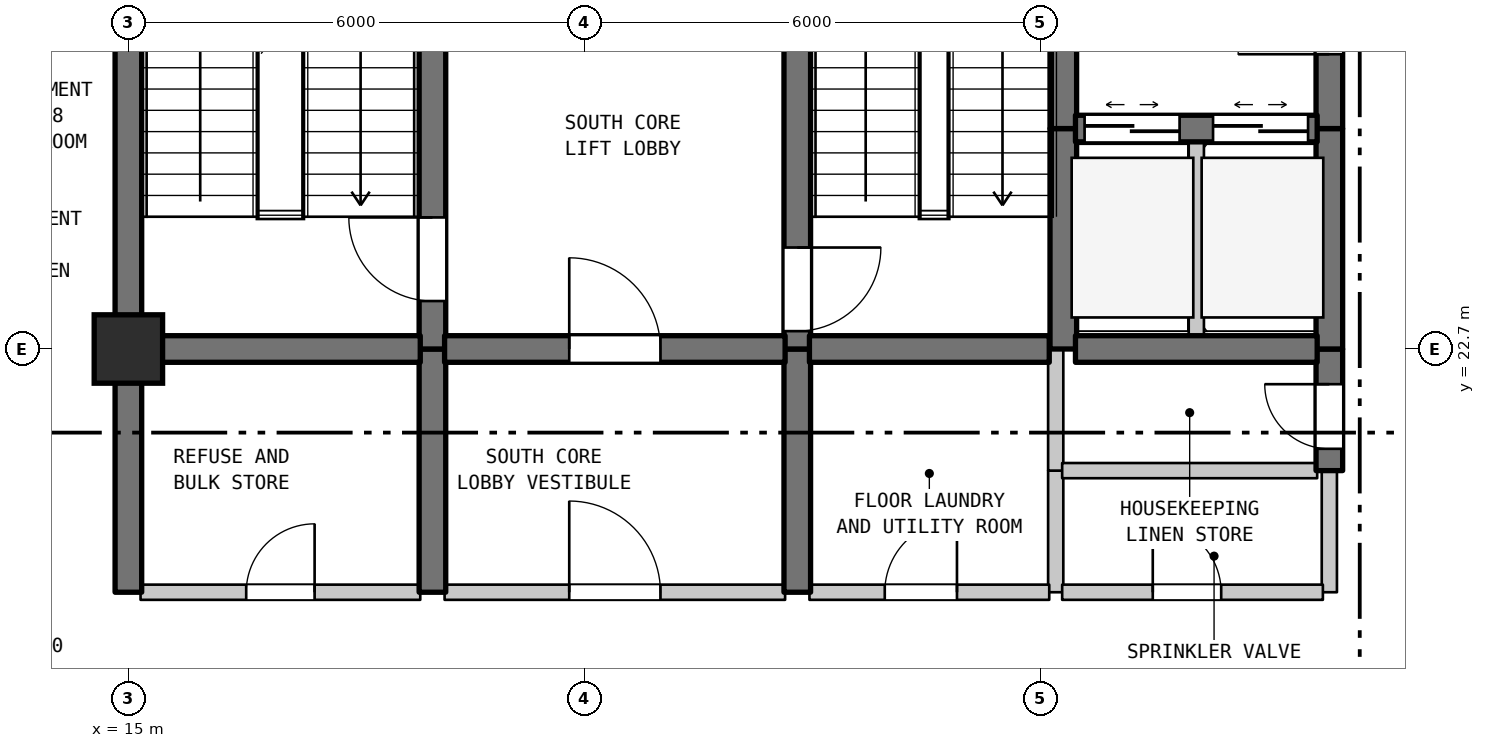
"""IFC4 building model, lengths in metres.
Left out: names, types, materials, properties, quantities, classifications, styles, units other than length and angle.
Written with IfcOpenShell. Run it as: python <this file> out.ifc"""

import sys

from ifc_helpers import new_model, si_unit, direction, frame, frame_2d, origin, origin_2d, place, context, subcontext, project, spatial, rectangle, extrude, element, fill, save


model = new_model("IFC4")
c1 = context("Model", 3, precision=1e-05, world=origin(), true_north=direction((0.0, 1.0)))
c2 = subcontext(c1, "Body", "Model", "MODEL_VIEW")
j1 = project(units=[si_unit("LENGTHUNIT", "METRE"), si_unit("PLANEANGLEUNIT", "RADIAN")], contexts=[c1])
p1 = place(None, origin())
s1 = spatial("IfcSite", under=j1, at=p1, CompositionType="ELEMENT")
p2 = place(p1, origin())
s2 = spatial("IfcBuilding", under=s1, at=p2, CompositionType="ELEMENT")
p3 = place(p2, frame((0.0, 0.0, 195.8)))
s3 = spatial("IfcBuildingStorey", under=s2, at=p3, CompositionType="ELEMENT", Elevation=195.8)
p4 = place(p3, frame((15.0, 22.7, 0.0), z_axis=(0.0, 0.0, 1.0), x_axis=(1.0, 0.0, 0.0)))
e1 = element("IfcColumn", 1, at=p4, inside=s3, PredefinedType="COLUMN", context=c2, shape_type="SweptSolid", body=[
    extrude(rectangle(XDim=0.9, YDim=0.9, at=origin_2d()), origin(), (0.0, 0.0, 1.0), 3.7),
])
p5 = place(p3, frame((15.0, 19.5, 0.0), z_axis=(0.0, 0.0, 1.0), x_axis=(0.0, 1.0, 0.0)))
e2 = element("IfcWall", 2, at=p5, inside=s3, PredefinedType="SHEAR", context=c2, shape_type="SweptSolid", body=[
    extrude(rectangle(XDim=3.2, YDim=0.35, at=frame_2d((1.6, 0.0))), origin(), (0.0, 0.0, 1.0), 3.39),
])
p6 = place(p3, frame((15.0, 22.7, 0.0), z_axis=(0.0, 0.0, 1.0), x_axis=(0.0, 1.0, 0.0)))
e3 = element("IfcWall", 3, at=p6, inside=s3, PredefinedType="SHEAR", context=c2, shape_type="SweptSolid", body=[
    extrude(rectangle(XDim=6.8, YDim=0.35, at=frame_2d((3.4, 0.0))), origin(), (0.0, 0.0, 1.0), 3.39),
])
p7 = place(p3, frame((19.0, 19.5, 0.0), z_axis=(0.0, 0.0, 1.0), x_axis=(0.0, 1.0, 0.0)))
e4 = element("IfcWall", 4, at=p7, inside=s3, PredefinedType="SHEAR", context=c2, shape_type="SweptSolid", body=[
    extrude(rectangle(XDim=3.2, YDim=0.35, at=frame_2d((1.6, 0.0))), origin(), (0.0, 0.0, 1.0), 3.39),
])
p8 = place(p3, frame((19.0, 22.7, 0.0), z_axis=(0.0, 0.0, 1.0), x_axis=(0.0, 1.0, 0.0)))
e5 = element("IfcWall", 5, at=p8, inside=s3, PredefinedType="SHEAR", context=c2, shape_type="SweptSolid", body=[
    extrude(rectangle(XDim=5.5, YDim=0.35, at=frame_2d((2.75, 0.0))), origin(), (0.0, 0.0, 1.0), 3.39),
])
p9 = place(p8, frame((0.631, 0.0, 0.0)))
e6 = element("IfcOpeningElement", 6, at=p9, cuts=e5, PredefinedType="OPENING", context=c2, shape_type="SweptSolid", body=[
    extrude(rectangle(XDim=1.1, YDim=2.15, at=frame_2d((0.55, 1.075))), frame((0.0, 0.185, 0.0), z_axis=(0.0, -1.0, 0.0), x_axis=(1.0, 0.0, 0.0)), (0.0, 0.0, 1.0), 0.37),
])
p10 = place(p3, frame((23.8, 19.5, 0.0), z_axis=(0.0, 0.0, 1.0), x_axis=(0.0, 1.0, 0.0)))
e7 = element("IfcWall", 7, at=p10, inside=s3, PredefinedType="SHEAR", context=c2, shape_type="SweptSolid", body=[
    extrude(rectangle(XDim=3.2, YDim=0.35, at=frame_2d((1.6, 0.0))), origin(), (0.0, 0.0, 1.0), 3.39),
])
p11 = place(p3, frame((23.8, 22.7, 0.0), z_axis=(0.0, 0.0, 1.0), x_axis=(0.0, 1.0, 0.0)))
e8 = element("IfcWall", 8, at=p11, inside=s3, PredefinedType="SHEAR", context=c2, shape_type="SweptSolid", body=[
    extrude(rectangle(XDim=5.5, YDim=0.35, at=frame_2d((2.75, 0.0))), origin(), (0.0, 0.0, 1.0), 3.39),
])
p12 = place(p11, frame((0.235, 0.0, 0.0)))
e9 = element("IfcOpeningElement", 9, at=p12, cuts=e8, PredefinedType="OPENING", context=c2, shape_type="SweptSolid", body=[
    extrude(rectangle(XDim=1.1, YDim=2.15, at=frame_2d((0.55, 1.075))), frame((0.0, 0.185, 0.0), z_axis=(0.0, -1.0, 0.0), x_axis=(1.0, 0.0, 0.0)), (0.0, 0.0, 1.0), 0.37),
])
p13 = place(p3, frame((27.2, 19.5, 0.0), z_axis=(0.0, 0.0, 1.0), x_axis=(0.0, 1.0, 0.0)))
e10 = element("IfcWall", 10, at=p13, inside=s3, PredefinedType="STANDARD", context=c2, shape_type="SweptSolid", body=[
    extrude(rectangle(XDim=1.6, YDim=0.2, at=frame_2d((0.8, 0.0))), origin(), (0.0, 0.0, 1.0), 3.39),
])
p14 = place(p3, frame((27.2, 21.1, 0.0), z_axis=(0.0, 0.0, 1.0), x_axis=(0.0, 1.0, 0.0)))
e11 = element("IfcWall", 11, at=p14, inside=s3, PredefinedType="STANDARD", context=c2, shape_type="SweptSolid", body=[
    extrude(rectangle(XDim=1.6, YDim=0.2, at=frame_2d((0.8, 0.0))), origin(), (0.0, 0.0, 1.0), 3.39),
])
p15 = place(p3, frame((27.3, 22.7, 0.0), z_axis=(0.0, 0.0, 1.0), x_axis=(0.0, 1.0, 0.0)))
e12 = element("IfcWall", 12, at=p15, inside=s3, PredefinedType="SHEAR", context=c2, shape_type="SweptSolid", body=[
    extrude(rectangle(XDim=2.9, YDim=0.35, at=frame_2d((1.45, 0.0))), origin(), (0.0, 0.0, 1.0), 3.39),
])
p16 = place(p3, frame((27.3, 25.6, 0.0), z_axis=(0.0, 0.0, 1.0), x_axis=(0.0, 1.0, 0.0)))
e13 = element("IfcWall", 13, at=p16, inside=s3, PredefinedType="SHEAR", context=c2, shape_type="SweptSolid", body=[
    extrude(rectangle(XDim=3.3, YDim=0.35, at=frame_2d((1.65, 0.0))), origin(), (0.0, 0.0, 1.0), 3.39),
])
p17 = place(p3, frame((29.05, 22.7, 0.0), z_axis=(0.0, 0.0, 1.0), x_axis=(0.0, 1.0, 0.0)))
e14 = element("IfcWall", 14, at=p17, inside=s3, PredefinedType="STANDARD", context=c2, shape_type="SweptSolid", body=[
    extrude(rectangle(XDim=2.9, YDim=0.2, at=frame_2d((1.45, 0.0))), origin(), (0.0, 0.0, 1.0), 3.39),
])
p18 = place(p3, frame((30.8, 19.5, 0.0), z_axis=(0.0, 0.0, 1.0), x_axis=(0.0, 1.0, 0.0)))
e15 = element("IfcWall", 15, at=p18, inside=s3, PredefinedType="STANDARD", context=c2, shape_type="SweptSolid", body=[
    extrude(rectangle(XDim=1.6, YDim=0.2, at=frame_2d((0.8, 0.0))), origin(), (0.0, 0.0, 1.0), 3.39),
])
p19 = place(p3, frame((30.8, 21.1, 0.0), z_axis=(0.0, 0.0, 1.0), x_axis=(0.0, 1.0, 0.0)))
e16 = element("IfcWall", 16, at=p19, inside=s3, PredefinedType="SHEAR", context=c2, shape_type="SweptSolid", body=[
    extrude(rectangle(XDim=1.6, YDim=0.35, at=frame_2d((0.8, 0.0))), origin(), (0.0, 0.0, 1.0), 3.39),
])
p20 = place(p19, frame((0.287, 0.0, 0.0)))
e17 = element("IfcOpeningElement", 17, at=p20, cuts=e16, PredefinedType="OPENING", context=c2, shape_type="SweptSolid", body=[
    extrude(rectangle(XDim=0.85, YDim=2.1, at=frame_2d((0.425, 1.05))), frame((0.0, 0.185, 0.0), z_axis=(0.0, -1.0, 0.0), x_axis=(1.0, 0.0, 0.0)), (0.0, 0.0, 1.0), 0.37),
])
p21 = place(p3, frame((30.8, 22.7, 0.0), z_axis=(0.0, 0.0, 1.0), x_axis=(0.0, 1.0, 0.0)))
e18 = element("IfcWall", 18, at=p21, inside=s3, PredefinedType="SHEAR", context=c2, shape_type="SweptSolid", body=[
    extrude(rectangle(XDim=2.9, YDim=0.35, at=frame_2d((1.45, 0.0))), origin(), (0.0, 0.0, 1.0), 3.39),
])
p22 = place(p3, frame((30.8, 25.6, 0.0), z_axis=(0.0, 0.0, 1.0), x_axis=(0.0, 1.0, 0.0)))
e19 = element("IfcWall", 19, at=p22, inside=s3, PredefinedType="SHEAR", context=c2, shape_type="SweptSolid", body=[
    extrude(rectangle(XDim=3.3, YDim=0.35, at=frame_2d((1.65, 0.0))), origin(), (0.0, 0.0, 1.0), 3.39),
])
p23 = place(p22, frame((0.978, 0.0, 0.0)))
e20 = element("IfcOpeningElement", 20, at=p23, cuts=e19, PredefinedType="OPENING", context=c2, shape_type="SweptSolid", body=[
    extrude(rectangle(XDim=1.2, YDim=2.2, at=frame_2d((0.6, 1.1))), frame((0.0, 0.185, 0.0), z_axis=(0.0, -1.0, 0.0), x_axis=(1.0, 0.0, 0.0)), (0.0, 0.0, 1.0), 0.37),
])
p24 = place(p3, frame((15.16, 19.5, 0.0), z_axis=(0.0, 0.0, 1.0), x_axis=(1.0, 0.0, 0.0)))
e21 = element("IfcWall", 21, at=p24, inside=s3, PredefinedType="STANDARD", context=c2, shape_type="SweptSolid", body=[
    extrude(rectangle(XDim=3.68, YDim=0.2, at=frame_2d((1.84, 0.0))), origin(), (0.0, 0.0, 1.0), 3.39),
])
p25 = place(p24, frame((1.39, 0.0, 0.0)))
e22 = element("IfcOpeningElement", 22, at=p25, cuts=e21, PredefinedType="OPENING", context=c2, shape_type="SweptSolid", body=[
    extrude(rectangle(XDim=0.9, YDim=2.15, at=frame_2d((0.45, 1.075))), frame((0.0, 0.11, 0.0), z_axis=(0.0, -1.0, 0.0), x_axis=(1.0, 0.0, 0.0)), (0.0, 0.0, 1.0), 0.22),
])
p26 = place(p3, frame((19.16, 19.5, 0.0), z_axis=(0.0, 0.0, 1.0), x_axis=(1.0, 0.0, 0.0)))
e23 = element("IfcWall", 23, at=p26, inside=s3, PredefinedType="STANDARD", context=c2, shape_type="SweptSolid", body=[
    extrude(rectangle(XDim=4.48, YDim=0.2, at=frame_2d((2.24, 0.0))), origin(), (0.0, 0.0, 1.0), 3.39),
])
p27 = place(p26, frame((1.64, 0.0, 0.0)))
e24 = element("IfcOpeningElement", 24, at=p27, cuts=e23, PredefinedType="OPENING", context=c2, shape_type="SweptSolid", body=[
    extrude(rectangle(XDim=1.2, YDim=2.2, at=frame_2d((0.6, 1.1))), frame((0.0, 0.11, 0.0), z_axis=(0.0, -1.0, 0.0), x_axis=(1.0, 0.0, 0.0)), (0.0, 0.0, 1.0), 0.22),
])
p28 = place(p3, frame((23.96, 19.5, 0.0), z_axis=(0.0, 0.0, 1.0), x_axis=(1.0, 0.0, 0.0)))
e25 = element("IfcWall", 25, at=p28, inside=s3, PredefinedType="STANDARD", context=c2, shape_type="SweptSolid", body=[
    extrude(rectangle(XDim=3.155, YDim=0.2, at=frame_2d((1.578, 0.0))), origin(), (0.0, 0.0, 1.0), 3.39),
])
p29 = place(p28, frame((0.991, 0.0, 0.0)))
e26 = element("IfcOpeningElement", 26, at=p29, cuts=e25, PredefinedType="OPENING", context=c2, shape_type="SweptSolid", body=[
    extrude(rectangle(XDim=0.95, YDim=2.15, at=frame_2d((0.475, 1.075))), frame((0.0, 0.11, 0.0), z_axis=(0.0, -1.0, 0.0), x_axis=(1.0, 0.0, 0.0)), (0.0, 0.0, 1.0), 0.22),
])
p30 = place(p3, frame((27.285, 19.5, 0.0), z_axis=(0.0, 0.0, 1.0), x_axis=(1.0, 0.0, 0.0)))
e27 = element("IfcWall", 27, at=p30, inside=s3, PredefinedType="STANDARD", context=c2, shape_type="SweptSolid", body=[
    extrude(rectangle(XDim=3.43, YDim=0.2, at=frame_2d((1.715, 0.0))), origin(), (0.0, 0.0, 1.0), 3.39),
])
p31 = place(p30, frame((1.192, 0.0, 0.0)))
e28 = element("IfcOpeningElement", 28, at=p31, cuts=e27, PredefinedType="OPENING", context=c2, shape_type="SweptSolid", body=[
    extrude(rectangle(XDim=0.9, YDim=2.15, at=frame_2d((0.45, 1.075))), frame((0.0, 0.11, 0.0), z_axis=(0.0, -1.0, 0.0), x_axis=(1.0, 0.0, 0.0)), (0.0, 0.0, 1.0), 0.22),
])
p32 = place(p3, frame((27.285, 21.1, 0.0), z_axis=(0.0, 0.0, 1.0), x_axis=(1.0, 0.0, 0.0)))
e29 = element("IfcWall", 29, at=p32, inside=s3, PredefinedType="STANDARD", context=c2, shape_type="SweptSolid", body=[
    extrude(rectangle(XDim=3.355, YDim=0.2, at=frame_2d((1.677, 0.0))), origin(), (0.0, 0.0, 1.0), 3.39),
])
p33 = place(p3, frame((15.16, 22.7, 0.0), z_axis=(0.0, 0.0, 1.0), x_axis=(1.0, 0.0, 0.0)))
e30 = element("IfcWall", 30, at=p33, inside=s3, PredefinedType="SHEAR", context=c2, shape_type="SweptSolid", body=[
    extrude(rectangle(XDim=3.68, YDim=0.35, at=frame_2d((1.84, 0.0))), origin(), (0.0, 0.0, 1.0), 3.39),
])
p34 = place(p3, frame((19.16, 22.7, 0.0), z_axis=(0.0, 0.0, 1.0), x_axis=(1.0, 0.0, 0.0)))
e31 = element("IfcWall", 31, at=p34, inside=s3, PredefinedType="SHEAR", context=c2, shape_type="SweptSolid", body=[
    extrude(rectangle(XDim=4.48, YDim=0.35, at=frame_2d((2.24, 0.0))), origin(), (0.0, 0.0, 1.0), 3.39),
])
p35 = place(p34, frame((1.64, 0.0, 0.0)))
e32 = element("IfcOpeningElement", 32, at=p35, cuts=e31, PredefinedType="OPENING", context=c2, shape_type="SweptSolid", body=[
    extrude(rectangle(XDim=1.2, YDim=2.2, at=frame_2d((0.6, 1.1))), frame((0.0, 0.185, 0.0), z_axis=(0.0, -1.0, 0.0), x_axis=(1.0, 0.0, 0.0)), (0.0, 0.0, 1.0), 0.37),
])
p36 = place(p3, frame((23.96, 22.7, 0.0), z_axis=(0.0, 0.0, 1.0), x_axis=(1.0, 0.0, 0.0)))
e33 = element("IfcWall", 33, at=p36, inside=s3, PredefinedType="SHEAR", context=c2, shape_type="SweptSolid", body=[
    extrude(rectangle(XDim=3.155, YDim=0.35, at=frame_2d((1.578, 0.0))), origin(), (0.0, 0.0, 1.0), 3.39),
])
p37 = place(p3, frame((27.46, 22.7, 0.0), z_axis=(0.0, 0.0, 1.0), x_axis=(1.0, 0.0, 0.0)))
e34 = element("IfcWall", 34, at=p37, inside=s3, PredefinedType="SHEAR", context=c2, shape_type="SweptSolid", body=[
    extrude(rectangle(XDim=3.18, YDim=0.35, at=frame_2d((1.59, 0.0))), origin(), (0.0, 0.0, 1.0), 3.39),
])
p38 = place(p3, frame((27.46, 25.6, 0.0), z_axis=(0.0, 0.0, 1.0), x_axis=(1.0, 0.0, 0.0)))
e35 = element("IfcWall", 35, at=p38, inside=s3, PredefinedType="SHEAR", context=c2, shape_type="SweptSolid", body=[
    extrude(rectangle(XDim=3.18, YDim=0.35, at=frame_2d((1.59, 0.0))), origin(), (0.0, 0.0, 1.0), 3.39),
])
p39 = place(p38, frame((0.12, 0.0, 0.0)))
e36 = element("IfcOpeningElement", 36, at=p39, cuts=e35, PredefinedType="OPENING", context=c2, shape_type="SweptSolid", body=[
    extrude(rectangle(XDim=1.25, YDim=2.2, at=frame_2d((0.625, 1.1))), frame((0.0, 0.185, 0.0), z_axis=(0.0, -1.0, 0.0), x_axis=(1.0, 0.0, 0.0)), (0.0, 0.0, 1.0), 0.37),
])
p40 = place(p38, frame((1.81, 0.0, 0.0)))
e37 = element("IfcOpeningElement", 37, at=p40, cuts=e35, PredefinedType="OPENING", context=c2, shape_type="SweptSolid", body=[
    extrude(rectangle(XDim=1.25, YDim=2.2, at=frame_2d((0.625, 1.1))), frame((0.0, 0.185, 0.0), z_axis=(0.0, -1.0, 0.0), x_axis=(1.0, 0.0, 0.0)), (0.0, 0.0, 1.0), 0.37),
])
p41 = place(p9, origin())
e38 = element("IfcDoor", 38, at=p41, inside=s3, OperationType="SINGLE_SWING_RIGHT", PredefinedType="DOOR", context=c2, shape_type="SweptSolid", body=[
    extrude(rectangle(XDim=1.1, YDim=2.15, at=frame_2d((0.55, 1.075))), frame((0.0, 0.025, 0.0), z_axis=(0.0, -1.0, 0.0), x_axis=(1.0, 0.0, 0.0)), (0.0, 0.0, 1.0), 0.05),
])
fill(e6, e38)
p42 = place(p12, frame((1.1, 0.0, 0.0), z_axis=(0.0, 0.0, 1.0), x_axis=(-1.0, 0.0, 0.0)))
e39 = element("IfcDoor", 39, at=p42, inside=s3, OperationType="SINGLE_SWING_RIGHT", PredefinedType="DOOR", context=c2, shape_type="SweptSolid", body=[
    extrude(rectangle(XDim=1.1, YDim=2.15, at=frame_2d((0.55, 1.075))), frame((0.0, 0.025, 0.0), z_axis=(0.0, -1.0, 0.0), x_axis=(1.0, 0.0, 0.0)), (0.0, 0.0, 1.0), 0.05),
])
fill(e9, e39)
p43 = place(p20, origin())
e40 = element("IfcDoor", 40, at=p43, inside=s3, OperationType="SINGLE_SWING_RIGHT", PredefinedType="DOOR", context=c2, shape_type="SweptSolid", body=[
    extrude(rectangle(XDim=0.85, YDim=2.1, at=frame_2d((0.425, 1.05))), frame((0.0, 0.025, 0.0), z_axis=(0.0, -1.0, 0.0), x_axis=(1.0, 0.0, 0.0)), (0.0, 0.0, 1.0), 0.05),
])
fill(e17, e40)
p44 = place(p23, origin())
e41 = element("IfcDoor", 41, at=p44, inside=s3, OperationType="SINGLE_SWING_LEFT", PredefinedType="DOOR", context=c2, shape_type="SweptSolid", body=[
    extrude(rectangle(XDim=1.2, YDim=2.2, at=frame_2d((0.6, 1.1))), frame((0.0, 0.025, 0.0), z_axis=(0.0, -1.0, 0.0), x_axis=(1.0, 0.0, 0.0)), (0.0, 0.0, 1.0), 0.05),
])
fill(e20, e41)
p45 = place(p25, origin())
e42 = element("IfcDoor", 42, at=p45, inside=s3, OperationType="SINGLE_SWING_RIGHT", PredefinedType="DOOR", context=c2, shape_type="SweptSolid", body=[
    extrude(rectangle(XDim=0.9, YDim=2.15, at=frame_2d((0.45, 1.075))), frame((0.0, 0.025, 0.0), z_axis=(0.0, -1.0, 0.0), x_axis=(1.0, 0.0, 0.0)), (0.0, 0.0, 1.0), 0.05),
])
fill(e22, e42)
p46 = place(p27, origin())
e43 = element("IfcDoor", 43, at=p46, inside=s3, OperationType="SINGLE_SWING_LEFT", PredefinedType="DOOR", context=c2, shape_type="SweptSolid", body=[
    extrude(rectangle(XDim=1.2, YDim=2.2, at=frame_2d((0.6, 1.1))), frame((0.0, 0.025, 0.0), z_axis=(0.0, -1.0, 0.0), x_axis=(1.0, 0.0, 0.0)), (0.0, 0.0, 1.0), 0.05),
])
fill(e24, e43)
p47 = place(p29, origin())
e44 = element("IfcDoor", 44, at=p47, inside=s3, OperationType="SINGLE_SWING_RIGHT", PredefinedType="DOOR", context=c2, shape_type="SweptSolid", body=[
    extrude(rectangle(XDim=0.95, YDim=2.15, at=frame_2d((0.475, 1.075))), frame((0.0, 0.025, 0.0), z_axis=(0.0, -1.0, 0.0), x_axis=(1.0, 0.0, 0.0)), (0.0, 0.0, 1.0), 0.05),
])
fill(e26, e44)
p48 = place(p31, origin())
e45 = element("IfcDoor", 45, at=p48, inside=s3, OperationType="SINGLE_SWING_LEFT", PredefinedType="DOOR", context=c2, shape_type="SweptSolid", body=[
    extrude(rectangle(XDim=0.9, YDim=2.15, at=frame_2d((0.45, 1.075))), frame((0.0, 0.025, 0.0), z_axis=(0.0, -1.0, 0.0), x_axis=(1.0, 0.0, 0.0)), (0.0, 0.0, 1.0), 0.05),
])
fill(e28, e45)
p49 = place(p35, origin())
e46 = element("IfcDoor", 46, at=p49, inside=s3, OperationType="SINGLE_SWING_LEFT", PredefinedType="DOOR", context=c2, shape_type="SweptSolid", body=[
    extrude(rectangle(XDim=1.2, YDim=2.2, at=frame_2d((0.6, 1.1))), frame((0.0, 0.025, 0.0), z_axis=(0.0, -1.0, 0.0), x_axis=(1.0, 0.0, 0.0)), (0.0, 0.0, 1.0), 0.05),
])
fill(e32, e46)
p50 = place(p39, origin())
e47 = element("IfcDoor", 47, at=p50, inside=s3, OperationType="DOUBLE_DOOR_SLIDING", PredefinedType="DOOR", context=c2, shape_type="SweptSolid", body=[
    extrude(rectangle(XDim=1.25, YDim=2.2, at=frame_2d((0.625, 1.1))), frame((0.0, 0.025, 0.0), z_axis=(0.0, -1.0, 0.0), x_axis=(1.0, 0.0, 0.0)), (0.0, 0.0, 1.0), 0.05),
])
fill(e36, e47)
p51 = place(p40, origin())
e48 = element("IfcDoor", 48, at=p51, inside=s3, OperationType="DOUBLE_DOOR_SLIDING", PredefinedType="DOOR", context=c2, shape_type="SweptSolid", body=[
    extrude(rectangle(XDim=1.25, YDim=2.2, at=frame_2d((0.625, 1.1))), frame((0.0, 0.025, 0.0), z_axis=(0.0, -1.0, 0.0), x_axis=(1.0, 0.0, 0.0)), (0.0, 0.0, 1.0), 0.05),
])
fill(e37, e48)
save(model, sys.argv[1])
